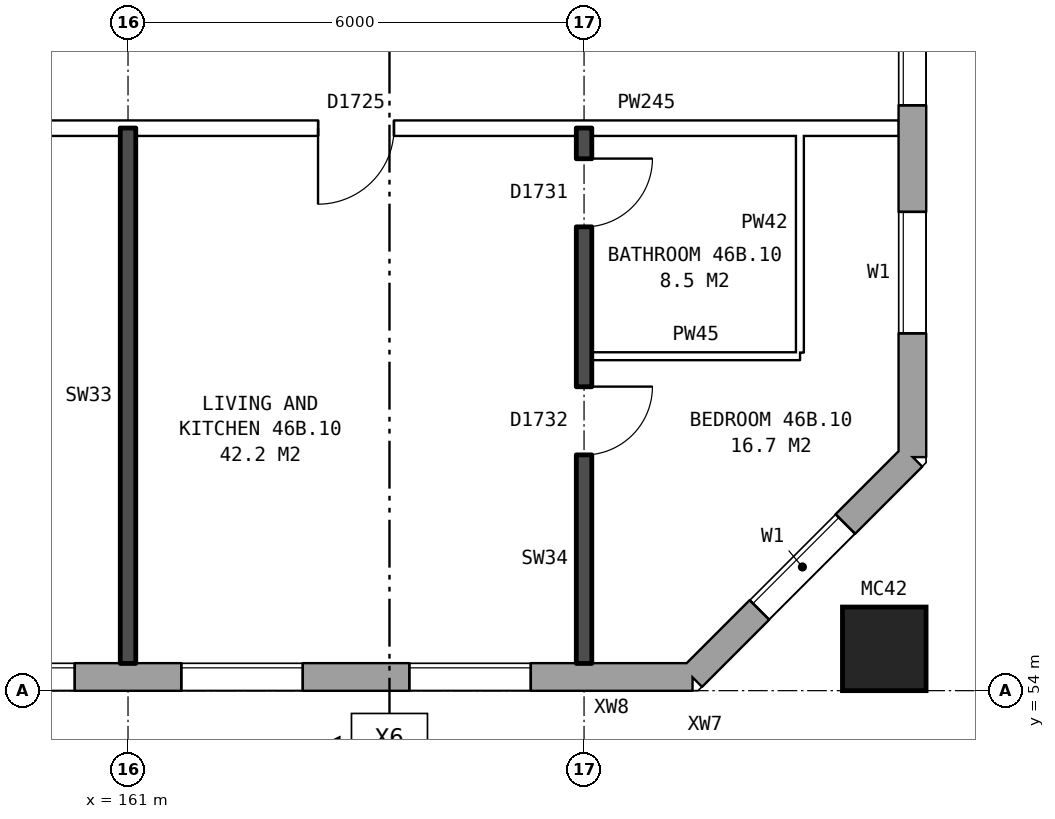
"""IFC4 building model, lengths in metres.
Left out: names, types, materials, properties, quantities, classifications, styles, units other than length and angle.
Written with IfcOpenShell. Run it as: python <this file> out.ifc"""

import sys

from ifc_helpers import new_model, si_unit, direction, frame, frame_2d, origin, origin_2d, place, context, subcontext, project, spatial, rectangle, hollow_rectangle, extrude, element, fill, save


model = new_model("IFC4")
c1 = context("Model", 3, precision=1e-05, world=origin(), true_north=direction((0.0, 1.0)))
c2 = subcontext(c1, "Body", "Model", "MODEL_VIEW")
j1 = project(units=[si_unit("LENGTHUNIT", "METRE"), si_unit("PLANEANGLEUNIT", "RADIAN")], contexts=[c1])
p1 = place(None, origin())
s1 = spatial("IfcSite", under=j1, at=p1, CompositionType="ELEMENT")
p2 = place(p1, origin())
s2 = spatial("IfcBuilding", under=s1, at=p2, CompositionType="ELEMENT")
p3 = place(p2, frame((0.0, 0.0, 164.0)))
s3 = spatial("IfcBuildingStorey", under=s2, at=p3, CompositionType="ELEMENT", Elevation=164.0)
p4 = place(p3, frame((170.95, 54.55, 0.0), z_axis=(0.0, 0.0, 1.0), x_axis=(1.0, 0.0, 0.0)))
e1 = element("IfcColumn", 1, at=p4, inside=s3, PredefinedType="COLUMN", context=c2, shape_type="SweptSolid", body=[
    extrude(hollow_rectangle(XDim=1.1, YDim=1.1, WallThickness=0.06, at=origin_2d()), origin(), (0.0, 0.0, 1.0), 3.1),
])
p5 = place(p3, frame((134.075, 54.18, 0.0), z_axis=(0.0, 0.0, 1.0), x_axis=(1.0, 0.0, 0.0)))
e2 = element("IfcWall", 2, at=p5, inside=s3, PredefinedType="STANDARD", context=c2, shape_type="SweptSolid", body=[
    extrude(rectangle(XDim=34.351, YDim=0.36, at=frame_2d((17.175, 0.0))), origin(), (0.0, 0.0, 1.0), 2.85),
])
p6 = place(p5, frame((0.625, 0.0, 0.8)))
e3 = element("IfcOpeningElement", 3, at=p6, cuts=e2, PredefinedType="OPENING", context=c2, shape_type="SweptSolid", body=[
    extrude(rectangle(XDim=1.6, YDim=1.8, at=frame_2d((0.8, 0.9))), frame((0.0, 0.19, 0.0), z_axis=(0.0, -1.0, 0.0), x_axis=(1.0, 0.0, 0.0)), (0.0, 0.0, 1.0), 0.38),
])
p7 = place(p5, frame((3.625, 0.0, 0.8)))
e4 = element("IfcOpeningElement", 4, at=p7, cuts=e2, PredefinedType="OPENING", context=c2, shape_type="SweptSolid", body=[
    extrude(rectangle(XDim=1.6, YDim=1.8, at=frame_2d((0.8, 0.9))), frame((0.0, 0.19, 0.0), z_axis=(0.0, -1.0, 0.0), x_axis=(1.0, 0.0, 0.0)), (0.0, 0.0, 1.0), 0.38),
])
p8 = place(p5, frame((6.625, 0.0, 0.8)))
e5 = element("IfcOpeningElement", 5, at=p8, cuts=e2, PredefinedType="OPENING", context=c2, shape_type="SweptSolid", body=[
    extrude(rectangle(XDim=1.6, YDim=1.8, at=frame_2d((0.8, 0.9))), frame((0.0, 0.19, 0.0), z_axis=(0.0, -1.0, 0.0), x_axis=(1.0, 0.0, 0.0)), (0.0, 0.0, 1.0), 0.38),
])
p9 = place(p5, frame((9.625, 0.0, 0.8)))
e6 = element("IfcOpeningElement", 6, at=p9, cuts=e2, PredefinedType="OPENING", context=c2, shape_type="SweptSolid", body=[
    extrude(rectangle(XDim=1.6, YDim=1.8, at=frame_2d((0.8, 0.9))), frame((0.0, 0.19, 0.0), z_axis=(0.0, -1.0, 0.0), x_axis=(1.0, 0.0, 0.0)), (0.0, 0.0, 1.0), 0.38),
])
p10 = place(p5, frame((12.625, 0.0, 0.8)))
e7 = element("IfcOpeningElement", 7, at=p10, cuts=e2, PredefinedType="OPENING", context=c2, shape_type="SweptSolid", body=[
    extrude(rectangle(XDim=1.6, YDim=1.8, at=frame_2d((0.8, 0.9))), frame((0.0, 0.19, 0.0), z_axis=(0.0, -1.0, 0.0), x_axis=(1.0, 0.0, 0.0)), (0.0, 0.0, 1.0), 0.38),
])
p11 = place(p5, frame((15.975, 0.0, 0.15)))
e8 = element("IfcOpeningElement", 8, at=p11, cuts=e2, PredefinedType="OPENING", context=c2, shape_type="SweptSolid", body=[
    extrude(rectangle(XDim=0.6, YDim=0.9, at=frame_2d((0.3, 0.45))), frame((0.0, 0.19, 0.0), z_axis=(0.0, -1.0, 0.0), x_axis=(1.0, 0.0, 0.0)), (0.0, 0.0, 1.0), 0.38),
])
p12 = place(p5, frame((18.825, 0.0, 1.7)))
e9 = element("IfcOpeningElement", 9, at=p12, cuts=e2, PredefinedType="OPENING", context=c2, shape_type="SweptSolid", body=[
    extrude(rectangle(XDim=0.6, YDim=0.9, at=frame_2d((0.3, 0.45))), frame((0.0, 0.19, 0.0), z_axis=(0.0, -1.0, 0.0), x_axis=(1.0, 0.0, 0.0)), (0.0, 0.0, 1.0), 0.38),
])
p13 = place(p5, frame((21.625, 0.0, 0.8)))
e10 = element("IfcOpeningElement", 10, at=p13, cuts=e2, PredefinedType="OPENING", context=c2, shape_type="SweptSolid", body=[
    extrude(rectangle(XDim=1.6, YDim=1.8, at=frame_2d((0.8, 0.9))), frame((0.0, 0.19, 0.0), z_axis=(0.0, -1.0, 0.0), x_axis=(1.0, 0.0, 0.0)), (0.0, 0.0, 1.0), 0.38),
])
p14 = place(p5, frame((24.625, 0.0, 0.8)))
e11 = element("IfcOpeningElement", 11, at=p14, cuts=e2, PredefinedType="OPENING", context=c2, shape_type="SweptSolid", body=[
    extrude(rectangle(XDim=1.6, YDim=1.8, at=frame_2d((0.8, 0.9))), frame((0.0, 0.19, 0.0), z_axis=(0.0, -1.0, 0.0), x_axis=(1.0, 0.0, 0.0)), (0.0, 0.0, 1.0), 0.38),
])
p15 = place(p5, frame((27.625, 0.0, 0.8)))
e12 = element("IfcOpeningElement", 12, at=p15, cuts=e2, PredefinedType="OPENING", context=c2, shape_type="SweptSolid", body=[
    extrude(rectangle(XDim=1.6, YDim=1.8, at=frame_2d((0.8, 0.9))), frame((0.0, 0.19, 0.0), z_axis=(0.0, -1.0, 0.0), x_axis=(1.0, 0.0, 0.0)), (0.0, 0.0, 1.0), 0.38),
])
p16 = place(p5, frame((30.625, 0.0, 0.8)))
e13 = element("IfcOpeningElement", 13, at=p16, cuts=e2, PredefinedType="OPENING", context=c2, shape_type="SweptSolid", body=[
    extrude(rectangle(XDim=1.6, YDim=1.8, at=frame_2d((0.8, 0.9))), frame((0.0, 0.19, 0.0), z_axis=(0.0, -1.0, 0.0), x_axis=(1.0, 0.0, 0.0)), (0.0, 0.0, 1.0), 0.38),
])
p17 = place(p5, frame((16.875, 0.0, 0.15)))
e14 = element("IfcOpeningElement", 14, at=p17, cuts=e2, PredefinedType="OPENING", context=c2, shape_type="SweptSolid", body=[
    extrude(rectangle(XDim=0.8, YDim=1.5, at=frame_2d((0.4, 0.75))), frame((0.0, 0.19, 0.0), z_axis=(0.0, -1.0, 0.0), x_axis=(1.0, 0.0, 0.0)), (0.0, 0.0, 1.0), 0.38),
])
p18 = place(p5, frame((19.725, 0.0, 0.9)))
e15 = element("IfcOpeningElement", 15, at=p18, cuts=e2, PredefinedType="OPENING", context=c2, shape_type="SweptSolid", body=[
    extrude(rectangle(XDim=1.0, YDim=1.5, at=frame_2d((0.5, 0.75))), frame((0.0, 0.19, 0.0), z_axis=(0.0, -1.0, 0.0), x_axis=(1.0, 0.0, 0.0)), (0.0, 0.0, 1.0), 0.38),
])
p19 = place(p3, frame((168.425, 54.18, 0.0), z_axis=(0.0, 0.0, 1.0), x_axis=(0.707106781187, 0.707106781187, 0.0)))
e16 = element("IfcWall", 16, at=p19, inside=s3, PredefinedType="STANDARD", context=c2, shape_type="SweptSolid", body=[
    extrude(rectangle(XDim=4.094, YDim=0.36, at=frame_2d((2.047, 0.0))), origin(), (0.0, 0.0, 1.0), 2.85),
])
p20 = place(p19, frame((1.247, 0.0, 0.8)))
e17 = element("IfcOpeningElement", 17, at=p20, cuts=e16, PredefinedType="OPENING", context=c2, shape_type="SweptSolid", body=[
    extrude(rectangle(XDim=1.6, YDim=1.8, at=frame_2d((0.8, 0.9))), frame((0.0, 0.19, 0.0), z_axis=(0.0, -1.0, 0.0), x_axis=(1.0, 0.0, 0.0)), (0.0, 0.0, 1.0), 0.38),
])
p21 = place(p3, frame((171.32, 57.075, 0.0), z_axis=(0.0, 0.0, 1.0), x_axis=(0.0, 1.0, 0.0)))
e18 = element("IfcWall", 18, at=p21, inside=s3, PredefinedType="STANDARD", context=c2, shape_type="SweptSolid", body=[
    extrude(rectangle(XDim=25.851, YDim=0.36, at=frame_2d((12.925, 0.0))), origin(), (0.0, 0.0, 1.0), 2.85),
])
p22 = place(p21, frame((1.625, 0.0, 0.8)))
e19 = element("IfcOpeningElement", 19, at=p22, cuts=e18, PredefinedType="OPENING", context=c2, shape_type="SweptSolid", body=[
    extrude(rectangle(XDim=1.6, YDim=1.8, at=frame_2d((0.8, 0.9))), frame((0.0, 0.19, 0.0), z_axis=(0.0, -1.0, 0.0), x_axis=(1.0, 0.0, 0.0)), (0.0, 0.0, 1.0), 0.38),
])
p23 = place(p21, frame((4.625, 0.0, 0.8)))
e20 = element("IfcOpeningElement", 20, at=p23, cuts=e18, PredefinedType="OPENING", context=c2, shape_type="SweptSolid", body=[
    extrude(rectangle(XDim=1.6, YDim=1.8, at=frame_2d((0.8, 0.9))), frame((0.0, 0.19, 0.0), z_axis=(0.0, -1.0, 0.0), x_axis=(1.0, 0.0, 0.0)), (0.0, 0.0, 1.0), 0.38),
])
p24 = place(p21, frame((7.625, 0.0, 0.8)))
e21 = element("IfcOpeningElement", 21, at=p24, cuts=e18, PredefinedType="OPENING", context=c2, shape_type="SweptSolid", body=[
    extrude(rectangle(XDim=1.6, YDim=1.8, at=frame_2d((0.8, 0.9))), frame((0.0, 0.19, 0.0), z_axis=(0.0, -1.0, 0.0), x_axis=(1.0, 0.0, 0.0)), (0.0, 0.0, 1.0), 0.38),
])
p25 = place(p21, frame((10.625, 0.0, 0.8)))
e22 = element("IfcOpeningElement", 22, at=p25, cuts=e18, PredefinedType="OPENING", context=c2, shape_type="SweptSolid", body=[
    extrude(rectangle(XDim=1.6, YDim=1.8, at=frame_2d((0.8, 0.9))), frame((0.0, 0.19, 0.0), z_axis=(0.0, -1.0, 0.0), x_axis=(1.0, 0.0, 0.0)), (0.0, 0.0, 1.0), 0.38),
])
p26 = place(p21, frame((13.625, 0.0, 0.8)))
e23 = element("IfcOpeningElement", 23, at=p26, cuts=e18, PredefinedType="OPENING", context=c2, shape_type="SweptSolid", body=[
    extrude(rectangle(XDim=1.6, YDim=1.8, at=frame_2d((0.8, 0.9))), frame((0.0, 0.19, 0.0), z_axis=(0.0, -1.0, 0.0), x_axis=(1.0, 0.0, 0.0)), (0.0, 0.0, 1.0), 0.38),
])
p27 = place(p21, frame((16.625, 0.0, 0.8)))
e24 = element("IfcOpeningElement", 24, at=p27, cuts=e18, PredefinedType="OPENING", context=c2, shape_type="SweptSolid", body=[
    extrude(rectangle(XDim=1.6, YDim=1.8, at=frame_2d((0.8, 0.9))), frame((0.0, 0.19, 0.0), z_axis=(0.0, -1.0, 0.0), x_axis=(1.0, 0.0, 0.0)), (0.0, 0.0, 1.0), 0.38),
])
p28 = place(p21, frame((19.625, 0.0, 0.8)))
e25 = element("IfcOpeningElement", 25, at=p28, cuts=e18, PredefinedType="OPENING", context=c2, shape_type="SweptSolid", body=[
    extrude(rectangle(XDim=1.6, YDim=1.8, at=frame_2d((0.8, 0.9))), frame((0.0, 0.19, 0.0), z_axis=(0.0, -1.0, 0.0), x_axis=(1.0, 0.0, 0.0)), (0.0, 0.0, 1.0), 0.38),
])
p29 = place(p21, frame((22.625, 0.0, 0.8)))
e26 = element("IfcOpeningElement", 26, at=p29, cuts=e18, PredefinedType="OPENING", context=c2, shape_type="SweptSolid", body=[
    extrude(rectangle(XDim=1.6, YDim=1.8, at=frame_2d((0.8, 0.9))), frame((0.0, 0.19, 0.0), z_axis=(0.0, -1.0, 0.0), x_axis=(1.0, 0.0, 0.0)), (0.0, 0.0, 1.0), 0.38),
])
p30 = place(p3, frame((167.1, 58.4, 0.0), z_axis=(0.0, 0.0, 1.0), x_axis=(1.0, 0.0, 0.0)))
e27 = element("IfcWall", 27, at=p30, inside=s3, PredefinedType="PARTITIONING", context=c2, shape_type="SweptSolid", body=[
    extrude(rectangle(XDim=2.74, YDim=0.1, at=frame_2d((1.37, 0.0))), origin(), (0.0, 0.0, 1.0), 2.85),
])
p31 = place(p3, frame((155.1, 61.4, 0.0), z_axis=(0.0, 0.0, 1.0), x_axis=(1.0, 0.0, 0.0)))
e28 = element("IfcWall", 28, at=p31, inside=s3, PredefinedType="PARTITIONING", context=c2, shape_type="SweptSolid", body=[
    extrude(rectangle(XDim=16.04, YDim=0.2, at=frame_2d((8.02, 0.0))), origin(), (0.0, 0.0, 1.0), 2.85),
])
p32 = place(p31, frame((3.6, 0.0, 0.0)))
e29 = element("IfcOpeningElement", 29, at=p32, cuts=e28, PredefinedType="OPENING", context=c2, shape_type="SweptSolid", body=[
    extrude(rectangle(XDim=1.0, YDim=2.1, at=frame_2d((0.5, 1.05))), frame((0.0, 0.11, 0.0), z_axis=(0.0, -1.0, 0.0), x_axis=(1.0, 0.0, 0.0)), (0.0, 0.0, 1.0), 0.22),
])
p33 = place(p31, frame((8.4, 0.0, 0.0)))
e30 = element("IfcOpeningElement", 30, at=p33, cuts=e28, PredefinedType="OPENING", context=c2, shape_type="SweptSolid", body=[
    extrude(rectangle(XDim=1.0, YDim=2.1, at=frame_2d((0.5, 1.05))), frame((0.0, 0.11, 0.0), z_axis=(0.0, -1.0, 0.0), x_axis=(1.0, 0.0, 0.0)), (0.0, 0.0, 1.0), 0.22),
])
p34 = place(p3, frame((161.0, 54.36, 0.0), z_axis=(0.0, 0.0, 1.0), x_axis=(0.0, 1.0, 0.0)))
e31 = element("IfcWall", 31, at=p34, inside=s3, PredefinedType="SOLIDWALL", context=c2, shape_type="SweptSolid", body=[
    extrude(rectangle(XDim=7.04, YDim=0.2, at=frame_2d((3.52, 0.0))), origin(), (0.0, 0.0, 1.0), 2.85),
])
p35 = place(p3, frame((167.0, 54.36, 0.0), z_axis=(0.0, 0.0, 1.0), x_axis=(0.0, 1.0, 0.0)))
e32 = element("IfcWall", 32, at=p35, inside=s3, PredefinedType="SOLIDWALL", context=c2, shape_type="SweptSolid", body=[
    extrude(rectangle(XDim=7.04, YDim=0.2, at=frame_2d((3.52, 0.0))), origin(), (0.0, 0.0, 1.0), 2.85),
])
p36 = place(p35, frame((2.74, 0.0, 0.0)))
e33 = element("IfcOpeningElement", 33, at=p36, cuts=e32, PredefinedType="OPENING", context=c2, shape_type="SweptSolid", body=[
    extrude(rectangle(XDim=0.9, YDim=2.1, at=frame_2d((0.45, 1.05))), frame((0.0, 0.11, 0.0), z_axis=(0.0, -1.0, 0.0), x_axis=(1.0, 0.0, 0.0)), (0.0, 0.0, 1.0), 0.22),
])
p37 = place(p35, frame((5.74, 0.0, 0.0)))
e34 = element("IfcOpeningElement", 34, at=p37, cuts=e32, PredefinedType="OPENING", context=c2, shape_type="SweptSolid", body=[
    extrude(rectangle(XDim=0.9, YDim=2.1, at=frame_2d((0.45, 1.05))), frame((0.0, 0.11, 0.0), z_axis=(0.0, -1.0, 0.0), x_axis=(1.0, 0.0, 0.0)), (0.0, 0.0, 1.0), 0.22),
])
p38 = place(p3, frame((169.84, 58.45, 0.0), z_axis=(0.0, 0.0, 1.0), x_axis=(0.0, 1.0, 0.0)))
e35 = element("IfcWall", 35, at=p38, inside=s3, PredefinedType="PARTITIONING", context=c2, shape_type="SweptSolid", body=[
    extrude(rectangle(XDim=2.85, YDim=0.1, at=frame_2d((1.425, 0.0))), origin(), (0.0, 0.0, 1.0), 2.85),
])
p39 = place(p14, origin())
e36 = element("IfcWindow", 36, at=p39, inside=s3, PartitioningType="SINGLE_PANEL", PredefinedType="WINDOW", context=c2, shape_type="SweptSolid", body=[
    extrude(rectangle(XDim=1.6, YDim=1.8, at=frame_2d((0.8, 0.9))), frame((0.0, 0.15, 0.0), z_axis=(0.0, -1.0, 0.0), x_axis=(1.0, 0.0, 0.0)), (0.0, 0.0, 1.0), 0.06),
])
fill(e11, e36)
p40 = place(p15, origin())
e37 = element("IfcWindow", 37, at=p40, inside=s3, PartitioningType="SINGLE_PANEL", PredefinedType="WINDOW", context=c2, shape_type="SweptSolid", body=[
    extrude(rectangle(XDim=1.6, YDim=1.8, at=frame_2d((0.8, 0.9))), frame((0.0, 0.15, 0.0), z_axis=(0.0, -1.0, 0.0), x_axis=(1.0, 0.0, 0.0)), (0.0, 0.0, 1.0), 0.06),
])
fill(e12, e37)
p41 = place(p16, origin())
e38 = element("IfcWindow", 38, at=p41, inside=s3, PartitioningType="SINGLE_PANEL", PredefinedType="WINDOW", context=c2, shape_type="SweptSolid", body=[
    extrude(rectangle(XDim=1.6, YDim=1.8, at=frame_2d((0.8, 0.9))), frame((0.0, 0.15, 0.0), z_axis=(0.0, -1.0, 0.0), x_axis=(1.0, 0.0, 0.0)), (0.0, 0.0, 1.0), 0.06),
])
fill(e13, e38)
p42 = place(p20, origin())
e39 = element("IfcWindow", 39, at=p42, inside=s3, PartitioningType="SINGLE_PANEL", PredefinedType="WINDOW", context=c2, shape_type="SweptSolid", body=[
    extrude(rectangle(XDim=1.6, YDim=1.8, at=frame_2d((0.8, 0.9))), frame((0.0, 0.15, 0.0), z_axis=(0.0, -1.0, 0.0), x_axis=(1.0, 0.0, 0.0)), (0.0, 0.0, 1.0), 0.06),
])
fill(e17, e39)
p43 = place(p22, origin())
e40 = element("IfcWindow", 40, at=p43, inside=s3, PartitioningType="SINGLE_PANEL", PredefinedType="WINDOW", context=c2, shape_type="SweptSolid", body=[
    extrude(rectangle(XDim=1.6, YDim=1.8, at=frame_2d((0.8, 0.9))), frame((0.0, 0.15, 0.0), z_axis=(0.0, -1.0, 0.0), x_axis=(1.0, 0.0, 0.0)), (0.0, 0.0, 1.0), 0.06),
])
fill(e19, e40)
p44 = place(p23, origin())
e41 = element("IfcWindow", 41, at=p44, inside=s3, PartitioningType="SINGLE_PANEL", PredefinedType="WINDOW", context=c2, shape_type="SweptSolid", body=[
    extrude(rectangle(XDim=1.6, YDim=1.8, at=frame_2d((0.8, 0.9))), frame((0.0, 0.15, 0.0), z_axis=(0.0, -1.0, 0.0), x_axis=(1.0, 0.0, 0.0)), (0.0, 0.0, 1.0), 0.06),
])
fill(e20, e41)
p45 = place(p36, frame((0.9, 0.0, 0.0), z_axis=(0.0, 0.0, 1.0), x_axis=(-1.0, 0.0, 0.0)))
e42 = element("IfcDoor", 42, at=p45, inside=s3, OperationType="SINGLE_SWING_LEFT", PredefinedType="DOOR", context=c2, shape_type="SweptSolid", body=[
    extrude(rectangle(XDim=0.9, YDim=2.1, at=frame_2d((0.45, 1.05))), frame((0.0, 0.025, 0.0), z_axis=(0.0, -1.0, 0.0), x_axis=(1.0, 0.0, 0.0)), (0.0, 0.0, 1.0), 0.05),
])
fill(e33, e42)
p46 = place(p33, frame((1.0, 0.0, 0.0), z_axis=(0.0, 0.0, 1.0), x_axis=(-1.0, 0.0, 0.0)))
e43 = element("IfcDoor", 43, at=p46, inside=s3, OperationType="SINGLE_SWING_RIGHT", PredefinedType="DOOR", context=c2, shape_type="SweptSolid", body=[
    extrude(rectangle(XDim=1.0, YDim=2.1, at=frame_2d((0.5, 1.05))), frame((0.0, 0.025, 0.0), z_axis=(0.0, -1.0, 0.0), x_axis=(1.0, 0.0, 0.0)), (0.0, 0.0, 1.0), 0.05),
])
fill(e30, e43)
p47 = place(p37, frame((0.9, 0.0, 0.0), z_axis=(0.0, 0.0, 1.0), x_axis=(-1.0, 0.0, 0.0)))
e44 = element("IfcDoor", 44, at=p47, inside=s3, OperationType="SINGLE_SWING_LEFT", PredefinedType="DOOR", context=c2, shape_type="SweptSolid", body=[
    extrude(rectangle(XDim=0.9, YDim=2.1, at=frame_2d((0.45, 1.05))), frame((0.0, 0.025, 0.0), z_axis=(0.0, -1.0, 0.0), x_axis=(1.0, 0.0, 0.0)), (0.0, 0.0, 1.0), 0.05),
])
fill(e34, e44)
save(model, sys.argv[1])
